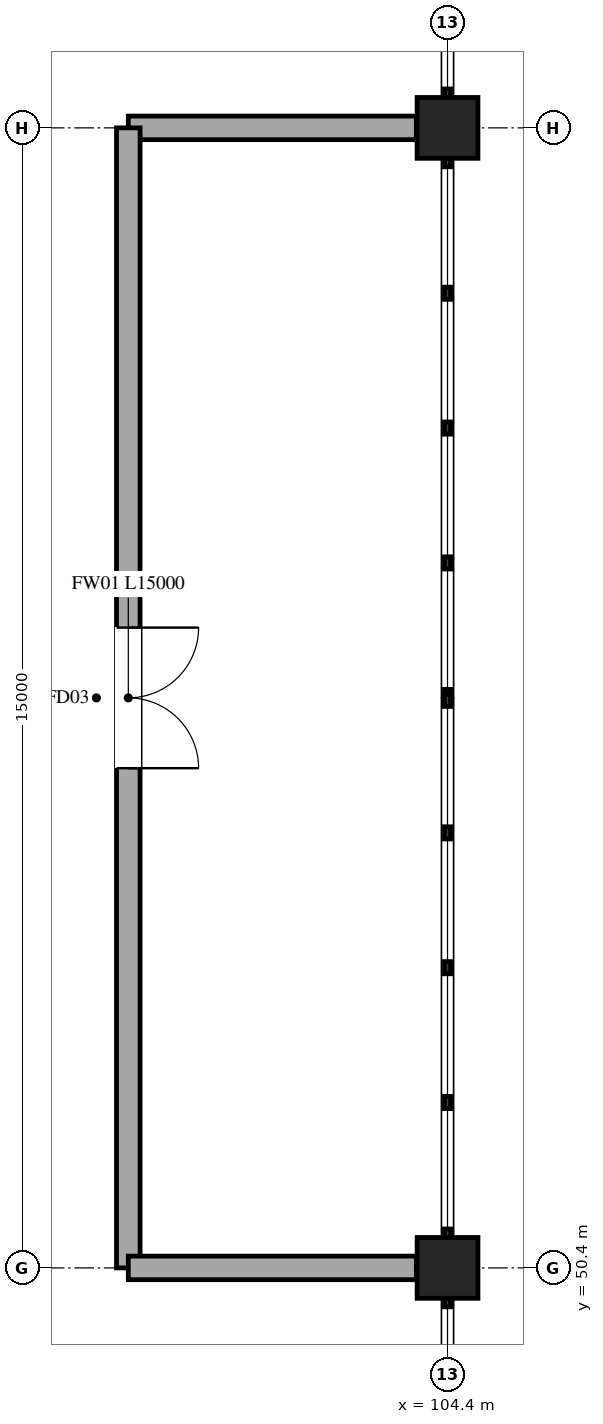
"""IFC4 building model, lengths in metres.
Left out: names, types, materials, properties, quantities, classifications, styles, units other than length and angle.
Written with IfcOpenShell. Run it as: python <this file> out.ifc"""

import sys

from ifc_helpers import new_model, si_unit, direction, frame, frame_2d, origin, origin_2d, place, context, subcontext, project, spatial, rectangle, extrude, element, fill, save


model = new_model("IFC4")
c1 = context("Model", 3, precision=1e-05, world=origin(), true_north=direction((0.0, 1.0)))
c2 = subcontext(c1, "Body", "Model", "MODEL_VIEW")
j1 = project(units=[si_unit("LENGTHUNIT", "METRE"), si_unit("PLANEANGLEUNIT", "RADIAN")], contexts=[c1])
p1 = place(None, origin())
s1 = spatial("IfcSite", under=j1, at=p1, CompositionType="ELEMENT")
p2 = place(p1, origin())
s2 = spatial("IfcBuilding", under=s1, at=p2, CompositionType="ELEMENT")
p3 = place(p2, frame((0.0, 0.0, 21.6)))
s3 = spatial("IfcBuildingStorey", under=s2, at=p3, CompositionType="ELEMENT", Elevation=21.6)
for number, where, z_axis, x_axis in (
    (1, (104.4, 50.4, 0.0), (0.0, 0.0, 1.0), (1.0, 0.0, 0.0)),
    (2, (104.4, 65.4, 0.0), (0.0, 0.0, 1.0), (1.0, 0.0, 0.0)),
):
    element("IfcColumn", number, at=place(p3, frame(where, z_axis=z_axis, x_axis=x_axis)), inside=s3, PredefinedType="COLUMN", context=c2, shape_type="SweptSolid", body=[
        extrude(rectangle(XDim=0.8, YDim=0.8, at=origin_2d()), origin(), (0.0, 0.0, 1.0), 5.1),
    ])
p4 = place(p3, frame((103.99, 65.4, 0.0), z_axis=(0.0, 0.0, 1.0), x_axis=(-1.0, 0.0, 0.0)))
e3 = element("IfcWall", 3, at=p4, inside=s3, PredefinedType="STANDARD", context=c2, shape_type="SweptSolid", body=[
    extrude(rectangle(XDim=3.79, YDim=0.31, at=frame_2d((1.895, 0.0))), origin(), (0.0, 0.0, 1.0), 4.06),
])
p5 = place(p3, frame((100.2, 65.4, 0.0), z_axis=(0.0, 0.0, 1.0), x_axis=(0.0, -1.0, 0.0)))
e4 = element("IfcWall", 4, at=p5, inside=s3, PredefinedType="STANDARD", context=c2, shape_type="SweptSolid", body=[
    extrude(rectangle(XDim=15.0, YDim=0.31, at=frame_2d((7.5, 0.0))), origin(), (0.0, 0.0, 1.0), 4.06),
])
p6 = place(p5, frame((6.575, 0.0, 0.0)))
e5 = element("IfcOpeningElement", 5, at=p6, cuts=e4, PredefinedType="OPENING", context=c2, shape_type="SweptSolid", body=[
    extrude(rectangle(XDim=1.85, YDim=2.3, at=frame_2d((0.925, 1.15))), frame((0.0, 0.165, 0.0), z_axis=(0.0, -1.0, 0.0), x_axis=(1.0, 0.0, 0.0)), (0.0, 0.0, 1.0), 0.33),
])
p7 = place(p3, frame((100.2, 50.4, 0.0), z_axis=(0.0, 0.0, 1.0), x_axis=(1.0, 0.0, 0.0)))
e6 = element("IfcWall", 6, at=p7, inside=s3, PredefinedType="STANDARD", context=c2, shape_type="SweptSolid", body=[
    extrude(rectangle(XDim=3.79, YDim=0.31, at=frame_2d((1.895, 0.0))), origin(), (0.0, 0.0, 1.0), 4.06),
])
p8 = place(p6, origin())
e7 = element("IfcDoor", 7, at=p8, inside=s3, OperationType="DOUBLE_DOOR_SINGLE_SWING", PredefinedType="DOOR", context=c2, shape_type="SweptSolid", body=[
    extrude(rectangle(XDim=1.85, YDim=2.3, at=frame_2d((0.925, 1.15))), frame((0.0, 0.025, 0.0), z_axis=(0.0, -1.0, 0.0), x_axis=(1.0, 0.0, 0.0)), (0.0, 0.0, 1.0), 0.05),
])
fill(e5, e7)
save(model, sys.argv[1])
